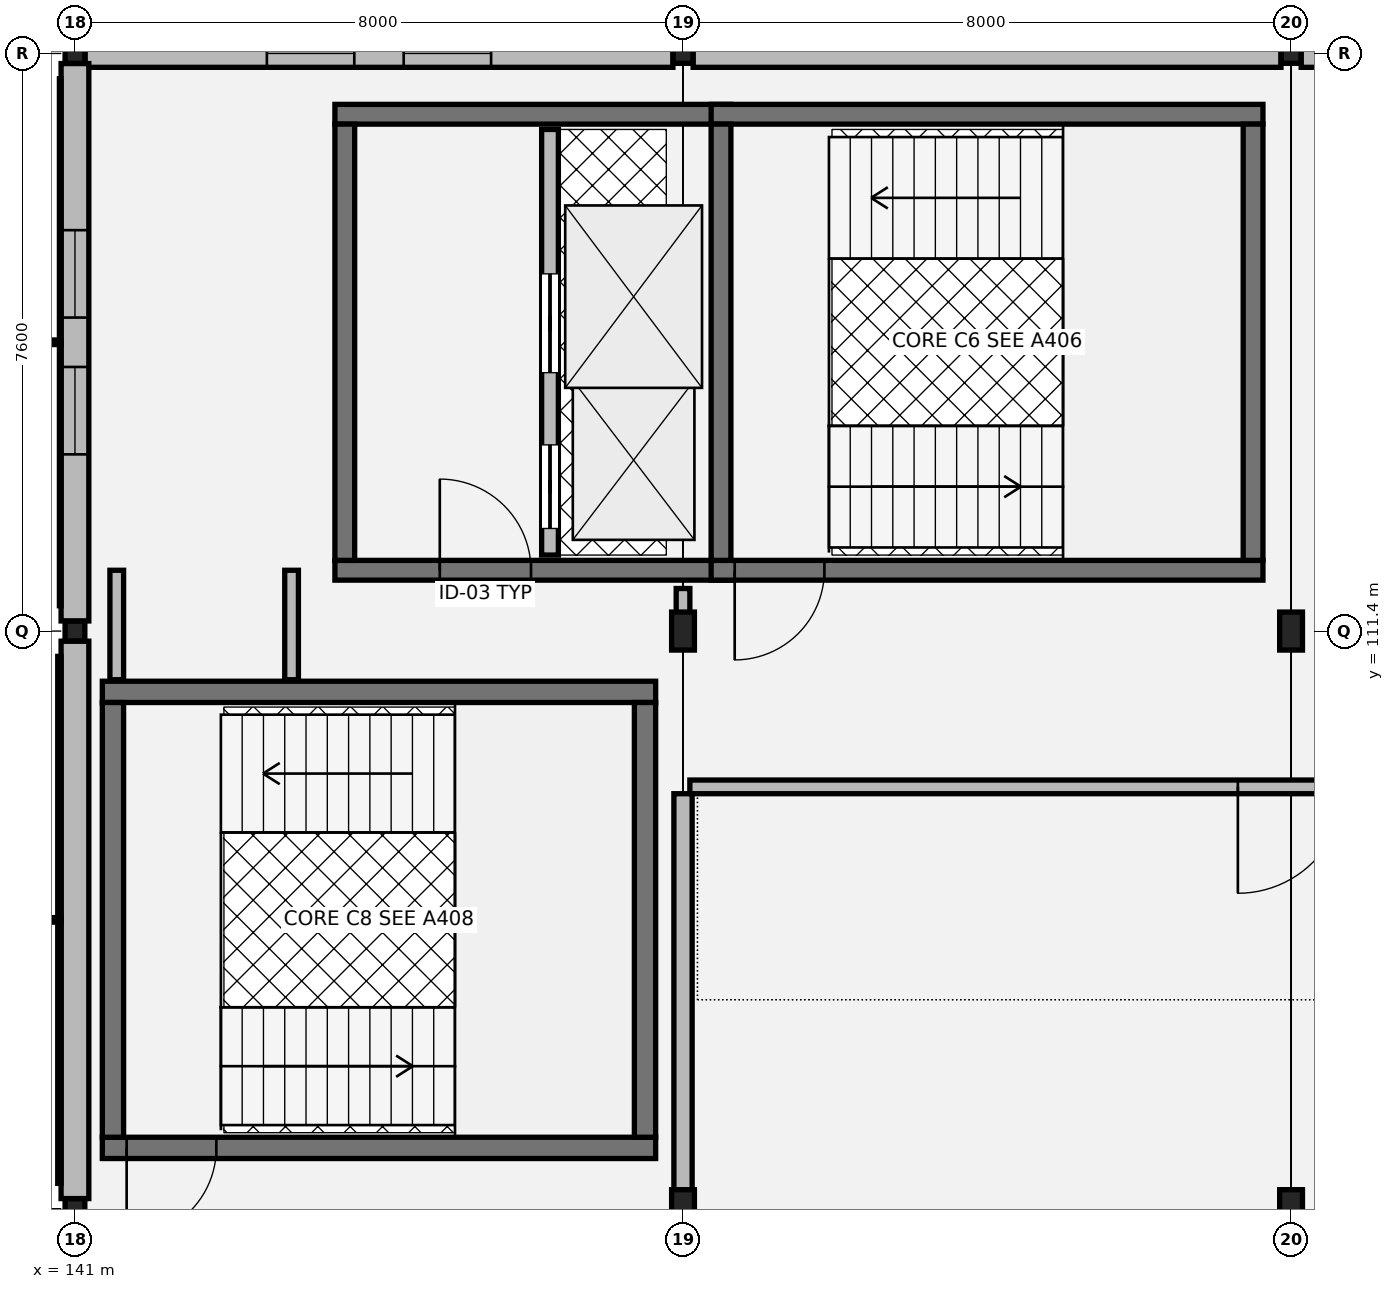
"""IFC4 building model, lengths in metres.
Left out: names, types, materials, properties, quantities, classifications, styles, units other than length and angle.
Written with IfcOpenShell. Run it as: python <this file> out.ifc"""

import sys

from ifc_helpers import new_model, si_unit, direction, frame, frame_2d, origin, origin_2d, place, context, subcontext, project, spatial, rectangle, hollow_rectangle, i_section, extrude, element, fill, save


model = new_model("IFC4")
c1 = context("Model", 3, precision=1e-05, world=origin(), true_north=direction((0.0, 1.0)))
c2 = subcontext(c1, "Body", "Model", "MODEL_VIEW")
j1 = project(units=[si_unit("LENGTHUNIT", "METRE"), si_unit("PLANEANGLEUNIT", "RADIAN")], contexts=[c1])
p1 = place(None, origin())
s1 = spatial("IfcSite", under=j1, at=p1, CompositionType="ELEMENT")
p2 = place(p1, origin())
s2 = spatial("IfcBuilding", under=s1, at=p2, CompositionType="ELEMENT")
p3 = place(p2, frame((0.0, 0.0, 9.18)))
s3 = spatial("IfcBuildingStorey", under=s2, at=p3, CompositionType="ELEMENT", Elevation=9.18)
for number, where, z_axis, x_axis in (
    (1, (141.0, 103.8, 0.0), (0.0, 0.0, 1.0), (1.0, 0.0, 0.0)),
    (2, (141.0, 111.4, 0.0), (0.0, 0.0, 1.0), (1.0, 0.0, 0.0)),
    (3, (141.0, 119.0, 0.0), (0.0, 0.0, 1.0), (1.0, 0.0, 0.0)),
):
    element("IfcColumn", number, at=place(p3, frame(where, z_axis=z_axis, x_axis=x_axis)), inside=s3, PredefinedType="COLUMN", context=c2, shape_type="SweptSolid", body=[
        extrude(hollow_rectangle(XDim=0.26, YDim=0.26, WallThickness=0.012, at=origin_2d()), origin(), (0.0, 0.0, 1.0), 4.055),
    ])
for number, where, z_axis, x_axis in (
    (4, (149.0, 103.8, 0.0), (0.0, 0.0, 1.0), (1.0, 0.0, 0.0)),
    (5, (149.0, 111.4, 0.0), (0.0, 0.0, 1.0), (1.0, 0.0, 0.0)),
):
    element("IfcColumn", number, at=place(p3, frame(where, z_axis=z_axis, x_axis=x_axis)), inside=s3, PredefinedType="COLUMN", context=c2, shape_type="SweptSolid", body=[
        extrude(i_section(OverallWidth=0.3, OverallDepth=0.5, WebThickness=0.014, FlangeThickness=0.028, at=origin_2d()), origin(), (0.0, 0.0, 1.0), 4.055),
    ])
p4 = place(p3, frame((149.0, 119.0, 0.0), z_axis=(0.0, 0.0, 1.0), x_axis=(1.0, 0.0, 0.0)))
e6 = element("IfcColumn", 6, at=p4, inside=s3, PredefinedType="COLUMN", context=c2, shape_type="SweptSolid", body=[
    extrude(hollow_rectangle(XDim=0.26, YDim=0.26, WallThickness=0.012, at=origin_2d()), origin(), (0.0, 0.0, 1.0), 4.055),
])
for number, where, z_axis, x_axis in (
    (7, (157.0, 103.8, 0.0), (0.0, 0.0, 1.0), (1.0, 0.0, 0.0)),
    (8, (157.0, 111.4, 0.0), (0.0, 0.0, 1.0), (1.0, 0.0, 0.0)),
):
    element("IfcColumn", number, at=place(p3, frame(where, z_axis=z_axis, x_axis=x_axis)), inside=s3, PredefinedType="COLUMN", context=c2, shape_type="SweptSolid", body=[
        extrude(i_section(OverallWidth=0.3, OverallDepth=0.5, WebThickness=0.014, FlangeThickness=0.028, at=origin_2d()), origin(), (0.0, 0.0, 1.0), 4.055),
    ])
p5 = place(p3, frame((157.0, 119.0, 0.0), z_axis=(0.0, 0.0, 1.0), x_axis=(1.0, 0.0, 0.0)))
e9 = element("IfcColumn", 9, at=p5, inside=s3, PredefinedType="COLUMN", context=c2, shape_type="SweptSolid", body=[
    extrude(hollow_rectangle(XDim=0.26, YDim=0.26, WallThickness=0.012, at=origin_2d()), origin(), (0.0, 0.0, 1.0), 4.055),
])
p6 = place(p3, frame((164.867, 119.0, 0.0), z_axis=(0.0, 0.0, 1.0), x_axis=(-1.0, 0.0, 0.0)))
e10 = element("IfcWall", 10, at=p6, inside=s3, PredefinedType="SOLIDWALL", context=c2, shape_type="SweptSolid", body=[
    extrude(rectangle(XDim=7.734, YDim=0.365, at=frame_2d((3.867, 0.0))), origin(), (0.0, 0.0, 1.0), 3.48),
])
p7 = place(p6, frame((2.692, 0.0, 0.8)))
e11 = element("IfcOpeningElement", 11, at=p7, cuts=e10, PredefinedType="OPENING", context=c2, shape_type="SweptSolid", body=[
    extrude(rectangle(XDim=0.85, YDim=1.95, at=frame_2d((0.425, 0.975))), frame((0.0, 0.192, 0.0), z_axis=(0.0, -1.0, 0.0), x_axis=(1.0, 0.0, 0.0)), (0.0, 0.0, 1.0), 0.385),
])
p8 = place(p6, frame((4.192, 0.0, 0.8)))
e12 = element("IfcOpeningElement", 12, at=p8, cuts=e10, PredefinedType="OPENING", context=c2, shape_type="SweptSolid", body=[
    extrude(rectangle(XDim=0.85, YDim=1.95, at=frame_2d((0.425, 0.975))), frame((0.0, 0.192, 0.0), z_axis=(0.0, -1.0, 0.0), x_axis=(1.0, 0.0, 0.0)), (0.0, 0.0, 1.0), 0.385),
])
p9 = place(p3, frame((156.867, 119.0, 0.0), z_axis=(0.0, 0.0, 1.0), x_axis=(-1.0, 0.0, 0.0)))
e13 = element("IfcWall", 13, at=p9, inside=s3, PredefinedType="SOLIDWALL", context=c2, shape_type="SweptSolid", body=[
    extrude(rectangle(XDim=7.734, YDim=0.365, at=frame_2d((3.867, 0.0))), origin(), (0.0, 0.0, 1.0), 3.48),
])
p10 = place(p3, frame((148.867, 119.0, 0.0), z_axis=(0.0, 0.0, 1.0), x_axis=(-1.0, 0.0, 0.0)))
e14 = element("IfcWall", 14, at=p10, inside=s3, PredefinedType="SOLIDWALL", context=c2, shape_type="SweptSolid", body=[
    extrude(rectangle(XDim=7.734, YDim=0.365, at=frame_2d((3.867, 0.0))), origin(), (0.0, 0.0, 1.0), 3.48),
])
p11 = place(p10, frame((2.392, 0.0, 0.8)))
e15 = element("IfcOpeningElement", 15, at=p11, cuts=e14, PredefinedType="OPENING", context=c2, shape_type="SweptSolid", body=[
    extrude(rectangle(XDim=1.15, YDim=2.1, at=frame_2d((0.575, 1.05))), frame((0.0, 0.192, 0.0), z_axis=(0.0, -1.0, 0.0), x_axis=(1.0, 0.0, 0.0)), (0.0, 0.0, 1.0), 0.385),
])
p12 = place(p10, frame((4.192, 0.0, 0.8)))
e16 = element("IfcOpeningElement", 16, at=p12, cuts=e14, PredefinedType="OPENING", context=c2, shape_type="SweptSolid", body=[
    extrude(rectangle(XDim=1.15, YDim=2.1, at=frame_2d((0.575, 1.05))), frame((0.0, 0.192, 0.0), z_axis=(0.0, -1.0, 0.0), x_axis=(1.0, 0.0, 0.0)), (0.0, 0.0, 1.0), 0.385),
])
p13 = place(p3, frame((141.0, 118.867, 0.0), z_axis=(0.0, 0.0, 1.0), x_axis=(0.0, -1.0, 0.0)))
e17 = element("IfcWall", 17, at=p13, inside=s3, PredefinedType="SOLIDWALL", context=c2, shape_type="SweptSolid", body=[
    extrude(rectangle(XDim=7.334, YDim=0.365, at=frame_2d((3.667, 0.0))), origin(), (0.0, 0.0, 1.0), 3.48),
])
p14 = place(p13, frame((2.192, 0.0, 0.8)))
e18 = element("IfcOpeningElement", 18, at=p14, cuts=e17, PredefinedType="OPENING", context=c2, shape_type="SweptSolid", body=[
    extrude(rectangle(XDim=1.15, YDim=2.1, at=frame_2d((0.575, 1.05))), frame((0.0, 0.192, 0.0), z_axis=(0.0, -1.0, 0.0), x_axis=(1.0, 0.0, 0.0)), (0.0, 0.0, 1.0), 0.385),
])
p15 = place(p13, frame((3.992, 0.0, 0.8)))
e19 = element("IfcOpeningElement", 19, at=p15, cuts=e17, PredefinedType="OPENING", context=c2, shape_type="SweptSolid", body=[
    extrude(rectangle(XDim=1.15, YDim=2.1, at=frame_2d((0.575, 1.05))), frame((0.0, 0.192, 0.0), z_axis=(0.0, -1.0, 0.0), x_axis=(1.0, 0.0, 0.0)), (0.0, 0.0, 1.0), 0.385),
])
p16 = place(p3, frame((141.0, 111.267, 0.0), z_axis=(0.0, 0.0, 1.0), x_axis=(0.0, -1.0, 0.0)))
e20 = element("IfcWall", 20, at=p16, inside=s3, PredefinedType="SOLIDWALL", context=c2, shape_type="SweptSolid", body=[
    extrude(rectangle(XDim=7.334, YDim=0.365, at=frame_2d((3.667, 0.0))), origin(), (0.0, 0.0, 1.0), 3.48),
])
p17 = place(p3, frame((144.42, 112.2, 0.0), z_axis=(0.0, 0.0, 1.0), x_axis=(1.0, 0.0, 0.0)))
e21 = element("IfcWall", 21, at=p17, inside=s3, PredefinedType="SHEAR", context=c2, shape_type="SweptSolid", body=[
    extrude(rectangle(XDim=5.21, YDim=0.26, at=frame_2d((2.605, 0.0))), origin(), (0.0, 0.0, 1.0), 3.845),
])
p18 = place(p17, frame((1.38, 0.0, 0.0)))
e22 = element("IfcOpeningElement", 22, at=p18, cuts=e21, PredefinedType="OPENING", context=c2, shape_type="SweptSolid", body=[
    extrude(rectangle(XDim=1.2, YDim=2.16, at=frame_2d((0.6, 1.08))), frame((0.0, 0.14, 0.0), z_axis=(0.0, -1.0, 0.0), x_axis=(1.0, 0.0, 0.0)), (0.0, 0.0, 1.0), 0.28),
])
p19 = place(p3, frame((149.63, 118.2, 0.0), z_axis=(0.0, 0.0, 1.0), x_axis=(-1.0, 0.0, 0.0)))
e23 = element("IfcWall", 23, at=p19, inside=s3, PredefinedType="SHEAR", context=c2, shape_type="SweptSolid", body=[
    extrude(rectangle(XDim=5.21, YDim=0.26, at=frame_2d((2.605, 0.0))), origin(), (0.0, 0.0, 1.0), 3.845),
])
p20 = place(p3, frame((144.55, 118.07, 0.0), z_axis=(0.0, 0.0, 1.0), x_axis=(0.0, -1.0, 0.0)))
e24 = element("IfcWall", 24, at=p20, inside=s3, PredefinedType="SHEAR", context=c2, shape_type="SweptSolid", body=[
    extrude(rectangle(XDim=5.74, YDim=0.26, at=frame_2d((2.87, 0.0))), origin(), (0.0, 0.0, 1.0), 3.845),
])
p21 = place(p3, frame((147.25, 112.4, 0.0), z_axis=(0.0, 0.0, 1.0), x_axis=(0.0, 1.0, 0.0)))
e25 = element("IfcWall", 25, at=p21, inside=s3, PredefinedType="SOLIDWALL", context=c2, shape_type="SweptSolid", body=[
    extrude(rectangle(XDim=5.6, YDim=0.22, at=frame_2d((2.8, 0.0))), origin(), (0.0, 0.0, 1.0), 3.845),
])
p22 = place(p21, frame((0.35, 0.0, 0.0)))
e26 = element("IfcOpeningElement", 26, at=p22, cuts=e25, PredefinedType="OPENING", context=c2, shape_type="SweptSolid", body=[
    extrude(rectangle(XDim=1.1, YDim=2.15, at=frame_2d((0.55, 1.075))), frame((0.0, 0.12, 0.0), z_axis=(0.0, -1.0, 0.0), x_axis=(1.0, 0.0, 0.0)), (0.0, 0.0, 1.0), 0.24),
])
p23 = place(p21, frame((2.4, 0.0, 0.0)))
e27 = element("IfcOpeningElement", 27, at=p23, cuts=e25, PredefinedType="OPENING", context=c2, shape_type="SweptSolid", body=[
    extrude(rectangle(XDim=1.3, YDim=2.18, at=frame_2d((0.65, 1.09))), frame((0.0, 0.12, 0.0), z_axis=(0.0, -1.0, 0.0), x_axis=(1.0, 0.0, 0.0)), (0.0, 0.0, 1.0), 0.24),
])
p24 = place(p3, frame((149.37, 112.2, 0.0), z_axis=(0.0, 0.0, 1.0), x_axis=(1.0, 0.0, 0.0)))
e28 = element("IfcWall", 28, at=p24, inside=s3, PredefinedType="SHEAR", context=c2, shape_type="SweptSolid", body=[
    extrude(rectangle(XDim=7.26, YDim=0.26, at=frame_2d((3.63, 0.0))), origin(), (0.0, 0.0, 1.0), 3.845),
])
p25 = place(p24, frame((0.31, 0.0, 0.0)))
e29 = element("IfcOpeningElement", 29, at=p25, cuts=e28, PredefinedType="OPENING", context=c2, shape_type="SweptSolid", body=[
    extrude(rectangle(XDim=1.18, YDim=2.18, at=frame_2d((0.59, 1.09))), frame((0.0, 0.14, 0.0), z_axis=(0.0, -1.0, 0.0), x_axis=(1.0, 0.0, 0.0)), (0.0, 0.0, 1.0), 0.28),
])
p26 = place(p3, frame((149.37, 118.2, 0.0), z_axis=(0.0, 0.0, 1.0), x_axis=(1.0, 0.0, 0.0)))
e30 = element("IfcWall", 30, at=p26, inside=s3, PredefinedType="SHEAR", context=c2, shape_type="SweptSolid", body=[
    extrude(rectangle(XDim=7.26, YDim=0.26, at=frame_2d((3.63, 0.0))), origin(), (0.0, 0.0, 1.0), 3.845),
])
for number, where, z_axis, x_axis in (
    (31, (149.5, 112.33, 0.0), (0.0, 0.0, 1.0), (0.0, 1.0, 0.0)),
    (32, (156.5, 112.33, 0.0), (0.0, 0.0, 1.0), (0.0, 1.0, 0.0)),
):
    element("IfcWall", number, at=place(p3, frame(where, z_axis=z_axis, x_axis=x_axis)), inside=s3, PredefinedType="SHEAR", context=c2, shape_type="SweptSolid", body=[
        extrude(rectangle(XDim=5.74, YDim=0.26, at=frame_2d((2.87, 0.0))), origin(), (0.0, 0.0, 1.0), 3.845),
    ])
p27 = place(p3, frame((141.36, 104.6, 0.0), z_axis=(0.0, 0.0, 1.0), x_axis=(1.0, 0.0, 0.0)))
e33 = element("IfcWall", 33, at=p27, inside=s3, PredefinedType="SHEAR", context=c2, shape_type="SweptSolid", body=[
    extrude(rectangle(XDim=7.28, YDim=0.28, at=frame_2d((3.64, 0.0))), origin(), (0.0, 0.0, 1.0), 3.845),
])
p28 = place(p27, frame((0.32, 0.0, 0.0)))
e34 = element("IfcOpeningElement", 34, at=p28, cuts=e33, PredefinedType="OPENING", context=c2, shape_type="SweptSolid", body=[
    extrude(rectangle(XDim=1.18, YDim=2.18, at=frame_2d((0.59, 1.09))), frame((0.0, 0.15, 0.0), z_axis=(0.0, -1.0, 0.0), x_axis=(1.0, 0.0, 0.0)), (0.0, 0.0, 1.0), 0.3),
])
p29 = place(p3, frame((141.36, 110.6, 0.0), z_axis=(0.0, 0.0, 1.0), x_axis=(1.0, 0.0, 0.0)))
e35 = element("IfcWall", 35, at=p29, inside=s3, PredefinedType="SHEAR", context=c2, shape_type="SweptSolid", body=[
    extrude(rectangle(XDim=7.28, YDim=0.28, at=frame_2d((3.64, 0.0))), origin(), (0.0, 0.0, 1.0), 3.845),
])
for number, where, z_axis, x_axis in (
    (36, (141.5, 104.74, 0.0), (0.0, 0.0, 1.0), (0.0, 1.0, 0.0)),
    (37, (148.5, 104.74, 0.0), (0.0, 0.0, 1.0), (0.0, 1.0, 0.0)),
):
    element("IfcWall", number, at=place(p3, frame(where, z_axis=z_axis, x_axis=x_axis)), inside=s3, PredefinedType="SHEAR", context=c2, shape_type="SweptSolid", body=[
        extrude(rectangle(XDim=5.72, YDim=0.28, at=frame_2d((2.86, 0.0))), origin(), (0.0, 0.0, 1.0), 3.845),
    ])
p30 = place(p3, frame((149.09, 109.35, 0.0), z_axis=(0.0, 0.0, 1.0), x_axis=(1.0, 0.0, 0.0)))
e38 = element("IfcWall", 38, at=p30, inside=s3, PredefinedType="PARTITIONING", context=c2, shape_type="SweptSolid", body=[
    extrude(rectangle(XDim=15.82, YDim=0.18, at=frame_2d((7.91, 0.0))), origin(), (0.0, 0.0, 1.0), 3.18),
])
p31 = place(p30, frame((7.21, 0.0, 0.0)))
e39 = element("IfcOpeningElement", 39, at=p31, cuts=e38, PredefinedType="OPENING", context=c2, shape_type="SweptSolid", body=[
    extrude(rectangle(XDim=1.4, YDim=2.22, at=frame_2d((0.7, 1.11))), frame((0.0, 0.1, 0.0), z_axis=(0.0, -1.0, 0.0), x_axis=(1.0, 0.0, 0.0)), (0.0, 0.0, 1.0), 0.2),
])
p32 = place(p3, frame((149.0, 111.64, 0.0), z_axis=(0.0, 0.0, 1.0), x_axis=(0.0, 1.0, 0.0)))
e40 = element("IfcWall", 40, at=p32, inside=s3, PredefinedType="PARTITIONING", context=c2, shape_type="SweptSolid", body=[
    extrude(rectangle(XDim=0.32, YDim=0.18, at=frame_2d((0.16, 0.0))), origin(), (0.0, 0.0, 1.0), 3.18),
])
for number, where, z_axis, x_axis in (
    (41, (141.55, 110.76, 0.0), (0.0, 0.0, 1.0), (0.0, 1.0, 0.0)),
    (42, (143.85, 110.76, 0.0), (0.0, 0.0, 1.0), (0.0, 1.0, 0.0)),
):
    element("IfcWall", number, at=place(p3, frame(where, z_axis=z_axis, x_axis=x_axis)), inside=s3, PredefinedType="PARTITIONING", context=c2, shape_type="SweptSolid", body=[
        extrude(rectangle(XDim=1.44, YDim=0.18, at=frame_2d((0.72, 0.0))), origin(), (0.0, 0.0, 1.0), 3.18),
    ])
p33 = place(p3, frame((149.0, 73.72, 0.0), z_axis=(0.0, 0.0, 1.0), x_axis=(0.0, 1.0, 0.0)))
e43 = element("IfcWall", 43, at=p33, inside=s3, PredefinedType="SOLIDWALL", context=c2, shape_type="SweptSolid", body=[
    extrude(rectangle(XDim=35.54, YDim=0.24, at=frame_2d((17.77, 0.0))), origin(), (0.0, 0.0, 1.0), 3.18),
])
p34 = place(p33, frame((17.12, 0.0, 0.0)))
e44 = element("IfcOpeningElement", 44, at=p34, cuts=e43, PredefinedType="OPENING", context=c2, shape_type="SweptSolid", body=[
    extrude(rectangle(XDim=1.3, YDim=2.2, at=frame_2d((0.65, 1.1))), frame((0.0, 0.13, 0.0), z_axis=(0.0, -1.0, 0.0), x_axis=(1.0, 0.0, 0.0)), (0.0, 0.0, 1.0), 0.26),
])
p35 = place(p11, origin())
e45 = element("IfcWindow", 45, at=p35, inside=s3, PartitioningType="SINGLE_PANEL", PredefinedType="WINDOW", context=c2, shape_type="SweptSolid", body=[
    extrude(rectangle(XDim=1.15, YDim=2.1, at=frame_2d((0.575, 1.05))), frame((0.0, 0.03, 0.0), z_axis=(0.0, -1.0, 0.0), x_axis=(1.0, 0.0, 0.0)), (0.0, 0.0, 1.0), 0.06),
])
fill(e15, e45)
p36 = place(p12, origin())
e46 = element("IfcWindow", 46, at=p36, inside=s3, PartitioningType="SINGLE_PANEL", PredefinedType="WINDOW", context=c2, shape_type="SweptSolid", body=[
    extrude(rectangle(XDim=1.15, YDim=2.1, at=frame_2d((0.575, 1.05))), frame((0.0, 0.03, 0.0), z_axis=(0.0, -1.0, 0.0), x_axis=(1.0, 0.0, 0.0)), (0.0, 0.0, 1.0), 0.06),
])
fill(e16, e46)
p37 = place(p14, origin())
e47 = element("IfcWindow", 47, at=p37, inside=s3, PartitioningType="SINGLE_PANEL", PredefinedType="WINDOW", context=c2, shape_type="SweptSolid", body=[
    extrude(rectangle(XDim=1.15, YDim=2.1, at=frame_2d((0.575, 1.05))), frame((0.0, 0.03, 0.0), z_axis=(0.0, -1.0, 0.0), x_axis=(1.0, 0.0, 0.0)), (0.0, 0.0, 1.0), 0.06),
])
fill(e18, e47)
p38 = place(p15, origin())
e48 = element("IfcWindow", 48, at=p38, inside=s3, PartitioningType="SINGLE_PANEL", PredefinedType="WINDOW", context=c2, shape_type="SweptSolid", body=[
    extrude(rectangle(XDim=1.15, YDim=2.1, at=frame_2d((0.575, 1.05))), frame((0.0, 0.03, 0.0), z_axis=(0.0, -1.0, 0.0), x_axis=(1.0, 0.0, 0.0)), (0.0, 0.0, 1.0), 0.06),
])
fill(e19, e48)
p39 = place(p18, origin())
e49 = element("IfcDoor", 49, at=p39, inside=s3, OperationType="SINGLE_SWING_LEFT", PredefinedType="DOOR", context=c2, shape_type="SweptSolid", body=[
    extrude(rectangle(XDim=1.2, YDim=2.16, at=frame_2d((0.6, 1.08))), frame((0.0, 0.025, 0.0), z_axis=(0.0, -1.0, 0.0), x_axis=(1.0, 0.0, 0.0)), (0.0, 0.0, 1.0), 0.05),
])
fill(e22, e49)
p40 = place(p22, origin())
e50 = element("IfcDoor", 50, at=p40, inside=s3, OperationType="SLIDING_TO_LEFT", PredefinedType="DOOR", context=c2, shape_type="SweptSolid", body=[
    extrude(rectangle(XDim=1.1, YDim=2.15, at=frame_2d((0.55, 1.075))), frame((0.0, 0.025, 0.0), z_axis=(0.0, -1.0, 0.0), x_axis=(1.0, 0.0, 0.0)), (0.0, 0.0, 1.0), 0.05),
])
fill(e26, e50)
p41 = place(p23, origin())
e51 = element("IfcDoor", 51, at=p41, inside=s3, OperationType="SLIDING_TO_LEFT", PredefinedType="DOOR", context=c2, shape_type="SweptSolid", body=[
    extrude(rectangle(XDim=1.3, YDim=2.18, at=frame_2d((0.65, 1.09))), frame((0.0, 0.025, 0.0), z_axis=(0.0, -1.0, 0.0), x_axis=(1.0, 0.0, 0.0)), (0.0, 0.0, 1.0), 0.05),
])
fill(e27, e51)
p42 = place(p25, origin())
e52 = element("IfcDoor", 52, at=p42, inside=s3, OperationType="SINGLE_SWING_RIGHT", PredefinedType="DOOR", context=c2, shape_type="SweptSolid", body=[
    extrude(rectangle(XDim=1.18, YDim=2.18, at=frame_2d((0.59, 1.09))), frame((0.0, 0.025, 0.0), z_axis=(0.0, -1.0, 0.0), x_axis=(1.0, 0.0, 0.0)), (0.0, 0.0, 1.0), 0.05),
])
fill(e29, e52)
p43 = place(p28, origin())
e53 = element("IfcDoor", 53, at=p43, inside=s3, OperationType="SINGLE_SWING_RIGHT", PredefinedType="DOOR", context=c2, shape_type="SweptSolid", body=[
    extrude(rectangle(XDim=1.18, YDim=2.18, at=frame_2d((0.59, 1.09))), frame((0.0, 0.025, 0.0), z_axis=(0.0, -1.0, 0.0), x_axis=(1.0, 0.0, 0.0)), (0.0, 0.0, 1.0), 0.05),
])
fill(e34, e53)
p44 = place(p31, origin())
e54 = element("IfcDoor", 54, at=p44, inside=s3, OperationType="SINGLE_SWING_RIGHT", PredefinedType="DOOR", context=c2, shape_type="SweptSolid", body=[
    extrude(rectangle(XDim=1.4, YDim=2.22, at=frame_2d((0.7, 1.11))), frame((0.0, 0.025, 0.0), z_axis=(0.0, -1.0, 0.0), x_axis=(1.0, 0.0, 0.0)), (0.0, 0.0, 1.0), 0.05),
])
fill(e39, e54)
save(model, sys.argv[1])
